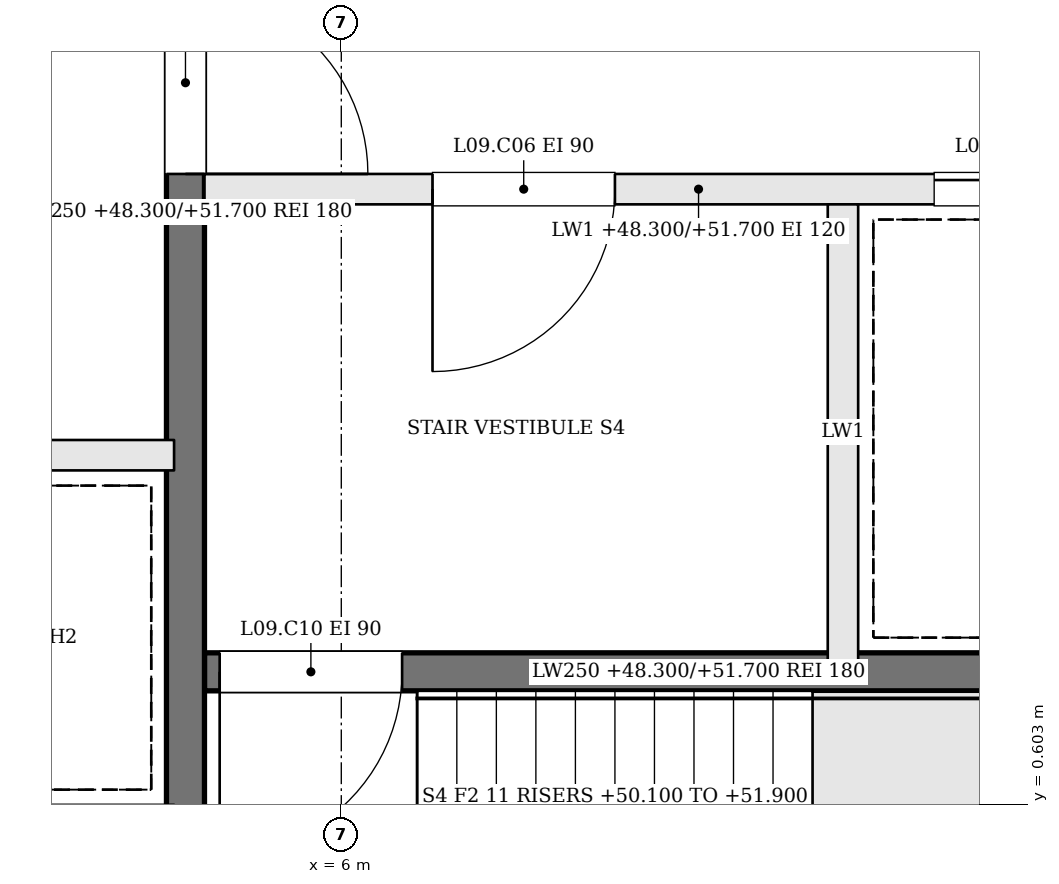
"""IFC4 building model, lengths in metres.
Left out: names, types, materials, properties, quantities, classifications, styles, units other than length and angle.
Written with IfcOpenShell. Run it as: python <this file> out.ifc"""

import sys

from ifc_helpers import new_model, si_unit, direction, frame, frame_2d, origin, place, context, subcontext, project, spatial, rectangle, extrude, element, fill, save


model = new_model("IFC4")
c1 = context("Model", 3, precision=1e-05, world=origin(), true_north=direction((0.0, 1.0)))
c2 = subcontext(c1, "Body", "Model", "MODEL_VIEW")
j1 = project(units=[si_unit("LENGTHUNIT", "METRE"), si_unit("PLANEANGLEUNIT", "RADIAN")], contexts=[c1])
p1 = place(None, origin())
s1 = spatial("IfcSite", under=j1, at=p1, CompositionType="ELEMENT")
p2 = place(p1, origin())
s2 = spatial("IfcBuilding", under=s1, at=p2, CompositionType="ELEMENT")
p3 = place(p2, frame((0.0, 0.0, 48.3)))
s3 = spatial("IfcBuildingStorey", under=s2, at=p3, CompositionType="ELEMENT", Elevation=48.3)
p4 = place(p3, frame((11.6, 4.65, 0.0), z_axis=(0.0, 0.0, 1.0), x_axis=(-1.0, 0.0, 0.0)))
e1 = element("IfcWall", 1, at=p4, inside=s3, PredefinedType="SOLIDWALL", context=c2, shape_type="SweptSolid", body=[
    extrude(rectangle(XDim=6.5, YDim=0.2, at=frame_2d((3.25, 0.0))), origin(), (0.0, 0.0, 1.0), 3.4),
])
p5 = place(p4, frame((3.8, 0.0, 0.0)))
e2 = element("IfcOpeningElement", 2, at=p5, cuts=e1, PredefinedType="OPENING", context=c2, shape_type="SweptSolid", body=[
    extrude(rectangle(XDim=1.2, YDim=2.1, at=frame_2d((0.6, 1.05))), frame((0.0, 0.11, 0.0), z_axis=(0.0, -1.0, 0.0), x_axis=(1.0, 0.0, 0.0)), (0.0, 0.0, 1.0), 0.22),
])
p6 = place(p4, frame((0.5, 0.0, 0.0)))
e3 = element("IfcOpeningElement", 3, at=p6, cuts=e1, PredefinedType="OPENING", context=c2, shape_type="SweptSolid", body=[
    extrude(rectangle(XDim=1.2, YDim=2.1, at=frame_2d((0.6, 1.05))), frame((0.0, 0.11, 0.0), z_axis=(0.0, -1.0, 0.0), x_axis=(1.0, 0.0, 0.0)), (0.0, 0.0, 1.0), 0.22),
])
p7 = place(p3, frame((11.6, 1.475, 0.0), z_axis=(0.0, 0.0, 1.0), x_axis=(-1.0, 0.0, 0.0)))
e4 = element("IfcWall", 4, at=p7, inside=s3, PredefinedType="SOLIDWALL", context=c2, shape_type="SweptSolid", body=[
    extrude(rectangle(XDim=6.5, YDim=0.25, at=frame_2d((3.25, 0.0))), origin(), (0.0, 0.0, 1.0), 3.4),
])
p8 = place(p7, frame((5.2, 0.0, 0.0)))
e5 = element("IfcOpeningElement", 5, at=p8, cuts=e4, PredefinedType="OPENING", context=c2, shape_type="SweptSolid", body=[
    extrude(rectangle(XDim=1.2, YDim=2.1, at=frame_2d((0.6, 1.05))), frame((0.0, 0.135, 0.0), z_axis=(0.0, -1.0, 0.0), x_axis=(1.0, 0.0, 0.0)), (0.0, 0.0, 1.0), 0.27),
])
p9 = place(p3, frame((9.3, 4.55, 0.0), z_axis=(0.0, 0.0, 1.0), x_axis=(0.0, -1.0, 0.0)))
e6 = element("IfcWall", 6, at=p9, inside=s3, PredefinedType="SOLIDWALL", context=c2, shape_type="SweptSolid", body=[
    extrude(rectangle(XDim=3.0, YDim=0.2, at=frame_2d((1.5, 0.0))), origin(), (0.0, 0.0, 1.0), 3.4),
])
p10 = place(p3, frame((4.975, 10.6, 0.0), z_axis=(0.0, 0.0, 1.0), x_axis=(0.0, -1.0, 0.0)))
e7 = element("IfcWall", 7, at=p10, inside=s3, PredefinedType="SOLIDWALL", context=c2, shape_type="SweptSolid", body=[
    extrude(rectangle(XDim=12.2, YDim=0.25, at=frame_2d((6.1, 0.0))), origin(), (0.0, 0.0, 1.0), 3.4),
])
p11 = place(p10, frame((4.65, 0.0, 0.0)))
e8 = element("IfcOpeningElement", 8, at=p11, cuts=e7, PredefinedType="OPENING", context=c2, shape_type="SweptSolid", body=[
    extrude(rectangle(XDim=1.2, YDim=2.1, at=frame_2d((0.6, 1.05))), frame((0.0, 0.135, 0.0), z_axis=(0.0, -1.0, 0.0), x_axis=(1.0, 0.0, 0.0)), (0.0, 0.0, 1.0), 0.27),
])
p12 = place(p3, frame((-4.9, 2.9, 0.0), z_axis=(0.0, 0.0, 1.0), x_axis=(1.0, 0.0, 0.0)))
e9 = element("IfcWall", 9, at=p12, inside=s3, PredefinedType="SOLIDWALL", context=c2, shape_type="SweptSolid", body=[
    extrude(rectangle(XDim=9.8, YDim=0.2, at=frame_2d((4.9, 0.0))), origin(), (0.0, 0.0, 1.0), 3.4),
])
p13 = place(p12, frame((0.675, 0.0, 0.0)))
e10 = element("IfcOpeningElement", 10, at=p13, cuts=e9, PredefinedType="OPENING", context=c2, shape_type="SweptSolid", body=[
    extrude(rectangle(XDim=1.1, YDim=2.1, at=frame_2d((0.55, 1.05))), frame((0.0, 0.11, 0.0), z_axis=(0.0, -1.0, 0.0), x_axis=(1.0, 0.0, 0.0)), (0.0, 0.0, 1.0), 0.22),
])
p14 = place(p12, frame((3.125, 0.0, 0.0)))
e11 = element("IfcOpeningElement", 11, at=p14, cuts=e9, PredefinedType="OPENING", context=c2, shape_type="SweptSolid", body=[
    extrude(rectangle(XDim=1.1, YDim=2.1, at=frame_2d((0.55, 1.05))), frame((0.0, 0.11, 0.0), z_axis=(0.0, -1.0, 0.0), x_axis=(1.0, 0.0, 0.0)), (0.0, 0.0, 1.0), 0.22),
])
p15 = place(p11, origin())
e12 = element("IfcDoor", 12, at=p15, inside=s3, OperationType="SINGLE_SWING_RIGHT", PredefinedType="DOOR", context=c2, shape_type="SweptSolid", body=[
    extrude(rectangle(XDim=1.2, YDim=2.1, at=frame_2d((0.6, 1.05))), frame((0.0, 0.025, 0.0), z_axis=(0.0, -1.0, 0.0), x_axis=(1.0, 0.0, 0.0)), (0.0, 0.0, 1.0), 0.05),
])
fill(e8, e12)
p16 = place(p5, origin())
e13 = element("IfcDoor", 13, at=p16, inside=s3, OperationType="SINGLE_SWING_RIGHT", PredefinedType="DOOR", context=c2, shape_type="SweptSolid", body=[
    extrude(rectangle(XDim=1.2, YDim=2.1, at=frame_2d((0.6, 1.05))), frame((0.0, 0.025, 0.0), z_axis=(0.0, -1.0, 0.0), x_axis=(1.0, 0.0, 0.0)), (0.0, 0.0, 1.0), 0.05),
])
fill(e2, e13)
p17 = place(p8, origin())
e14 = element("IfcDoor", 14, at=p17, inside=s3, OperationType="SINGLE_SWING_RIGHT", PredefinedType="DOOR", context=c2, shape_type="SweptSolid", body=[
    extrude(rectangle(XDim=1.2, YDim=2.1, at=frame_2d((0.6, 1.05))), frame((0.0, 0.025, 0.0), z_axis=(0.0, -1.0, 0.0), x_axis=(1.0, 0.0, 0.0)), (0.0, 0.0, 1.0), 0.05),
])
fill(e5, e14)
p18 = place(p6, origin())
e15 = element("IfcDoor", 15, at=p18, inside=s3, OperationType="SLIDING_TO_RIGHT", PredefinedType="DOOR", context=c2, shape_type="SweptSolid", body=[
    extrude(rectangle(XDim=1.2, YDim=2.1, at=frame_2d((0.6, 1.05))), frame((0.0, 0.025, 0.0), z_axis=(0.0, -1.0, 0.0), x_axis=(1.0, 0.0, 0.0)), (0.0, 0.0, 1.0), 0.05),
])
fill(e3, e15)
save(model, sys.argv[1])
